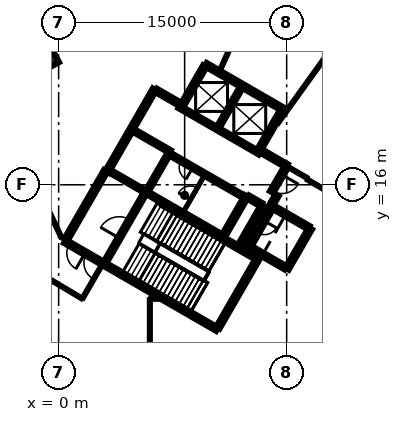
"""IFC4 building model, lengths in metres.
Left out: names, types, materials, properties, quantities, classifications, styles, units other than length and angle.
Written with IfcOpenShell. Run it as: python <this file> out.ifc"""

import sys

from ifc_helpers import new_model, si_unit, direction, frame, frame_2d, origin, origin_2d, place, context, subcontext, project, spatial, rectangle, extrude, element, fill, save


model = new_model("IFC4")
c1 = context("Model", 3, precision=1e-05, world=origin(), true_north=direction((0.0, 1.0)))
c2 = subcontext(c1, "Body", "Model", "MODEL_VIEW")
j1 = project(units=[si_unit("LENGTHUNIT", "METRE"), si_unit("PLANEANGLEUNIT", "RADIAN")], contexts=[c1])
p1 = place(None, origin())
s1 = spatial("IfcSite", under=j1, at=p1, CompositionType="ELEMENT")
p2 = place(p1, origin())
s2 = spatial("IfcBuilding", under=s1, at=p2, CompositionType="ELEMENT")
p3 = place(p2, origin())
s3 = spatial("IfcBuildingStorey", under=s2, at=p3, CompositionType="ELEMENT", Elevation=0.0)
p4 = place(p3, frame((-1.197, 24.423, -0.45), z_axis=(0.0, 0.0, 1.0), x_axis=(-0.476198301069, 0.879337920289, 0.0)))
e1 = element("IfcColumn", 1, at=p4, inside=s3, PredefinedType="COLUMN", context=c2, shape_type="SweptSolid", body=[
    extrude(rectangle(XDim=1.8, YDim=1.8, at=origin_2d()), origin(), (0.0, 0.0, 1.0), 5.15),
])
p5 = place(p3, frame((10.42, 6.498, 0.0), z_axis=(0.0, 0.0, 1.0), x_axis=(-0.866021906294, 0.500006057782, 0.0)))
e2 = element("IfcWall", 2, at=p5, inside=s3, PredefinedType="SHEAR", context=c2, shape_type="SweptSolid", body=[
    extrude(rectangle(XDim=11.55, YDim=0.25, at=frame_2d((5.775, 0.0))), origin(), (0.0, 0.0, 1.0), 7.1),
])
p6 = place(p5, frame((10.025, 0.0, 0.0)))
e3 = element("IfcOpeningElement", 3, at=p6, cuts=e2, PredefinedType="OPENING", context=c2, shape_type="SweptSolid", body=[
    extrude(rectangle(XDim=1.2, YDim=2.1, at=frame_2d((0.6, 1.05))), frame((0.0, 0.135, 0.0), z_axis=(0.0, -1.0, 0.0), x_axis=(1.0, 0.0, 0.0)), (0.0, 0.0, 1.0), 0.27),
])
p7 = place(p5, frame((8.725, 0.0, 0.0)))
e4 = element("IfcOpeningElement", 4, at=p7, cuts=e2, PredefinedType="OPENING", context=c2, shape_type="SweptSolid", body=[
    extrude(rectangle(XDim=1.2, YDim=2.1, at=frame_2d((0.6, 1.05))), frame((0.0, 0.135, 0.0), z_axis=(0.0, -1.0, 0.0), x_axis=(1.0, 0.0, 0.0)), (0.0, 0.0, 1.0), 0.27),
])
p8 = place(p3, frame((3.179, 16.856, 0.0), z_axis=(0.0, 0.0, 1.0), x_axis=(0.500004234368, 0.866022959057, 0.0)))
e5 = element("IfcWall", 5, at=p8, inside=s3, PredefinedType="SHEAR", context=c2, shape_type="SweptSolid", body=[
    extrude(rectangle(XDim=6.25, YDim=0.25, at=frame_2d((3.125, 0.0))), origin(), (0.0, 0.0, 1.0), 7.1),
])
p9 = place(p3, frame((9.673, 23.903, 0.0), z_axis=(0.0, 0.0, 1.0), x_axis=(0.86603616409, -0.499981362141, 0.0)))
e6 = element("IfcWall", 6, at=p9, inside=s3, PredefinedType="SHEAR", context=c2, shape_type="SweptSolid", body=[
    extrude(rectangle(XDim=5.85, YDim=0.25, at=frame_2d((2.925, 0.0))), origin(), (0.0, 0.0, 1.0), 7.1),
])
p10 = place(p3, frame((0.48, 12.381, 0.0), z_axis=(0.0, 0.0, 1.0), x_axis=(0.49999885962, 0.866026062182, 0.0)))
e7 = element("IfcWall", 7, at=p10, inside=s3, PredefinedType="SHEAR", context=c2, shape_type="SweptSolid", body=[
    extrude(rectangle(XDim=5.225, YDim=0.25, at=frame_2d((2.612, 0.0))), origin(), (0.0, 0.0, 1.0), 7.1),
])
p11 = place(p3, frame((13.238, 11.378, 0.0), z_axis=(0.0, 0.0, 1.0), x_axis=(-0.500008851346, -0.866020293397, 0.0)))
e8 = element("IfcWall", 8, at=p11, inside=s3, PredefinedType="SHEAR", context=c2, shape_type="SweptSolid", body=[
    extrude(rectangle(XDim=5.51, YDim=0.25, at=frame_2d((2.755, 0.0))), origin(), (0.0, 0.0, 1.0), 7.1),
])
p12 = place(p3, frame((12.357, 15.252, 0.0), z_axis=(0.0, 0.0, 1.0), x_axis=(-0.500028443584, -0.866008981251, 0.0)))
e9 = element("IfcWall", 9, at=p12, inside=s3, PredefinedType="SHEAR", context=c2, shape_type="SweptSolid", body=[
    extrude(rectangle(XDim=3.2, YDim=0.25, at=frame_2d((1.6, 0.0))), origin(), (0.0, 0.0, 1.0), 7.1),
])
for number, where, z_axis, x_axis in (
    (10, (8.123, 21.219, 0.0), (0.0, 0.0, 1.0), (0.5, 0.866, 0.0)),
    (11, (14.676, 20.87, 0.0), (0.0, 0.0, 1.0), (-0.5, -0.866, 0.0)),
):
    element("IfcWall", number, at=place(p3, frame(where, z_axis=z_axis, x_axis=x_axis)), inside=s3, PredefinedType="SHEAR", context=c2, shape_type="SweptSolid", body=[
        extrude(rectangle(XDim=2.975, YDim=0.25, at=frame_2d((1.487, 0.0))), origin(), (0.0, 0.0, 1.0), 7.1),
    ])
p13 = place(p3, frame((16.552, 13.119, 0.0), z_axis=(0.0, 0.0, 1.0), x_axis=(-0.499978833458, -0.866037623948, 0.0)))
e12 = element("IfcWall", 12, at=p13, inside=s3, PredefinedType="SHEAR", context=c2, shape_type="SweptSolid", body=[
    extrude(rectangle(XDim=3.05, YDim=0.25, at=frame_2d((1.525, 0.0))), origin(), (0.0, 0.0, 1.0), 7.1),
])
p14 = place(p3, frame((14.918, 10.54, 0.0), z_axis=(0.0, 0.0, 1.0), x_axis=(-0.866063538972, 0.499933942099, 0.0)))
e13 = element("IfcWall", 13, at=p14, inside=s3, PredefinedType="SHEAR", context=c2, shape_type="SweptSolid", body=[
    extrude(rectangle(XDim=2.865, YDim=0.25, at=frame_2d((1.432, 0.0))), origin(), (0.0, 0.0, 1.0), 7.1),
])
p15 = place(p3, frame((13.963, 14.614, 0.0), z_axis=(0.0, 0.0, 1.0), x_axis=(0.866042235819, -0.499970844928, 0.0)))
e14 = element("IfcWall", 14, at=p15, inside=s3, PredefinedType="SHEAR", context=c2, shape_type="SweptSolid", body=[
    extrude(rectangle(XDim=2.865, YDim=0.25, at=frame_2d((1.432, 0.0))), origin(), (0.0, 0.0, 1.0), 7.1),
])
p16 = place(p3, frame((11.888, 11.961, 0.0), z_axis=(0.0, 0.0, 1.0), x_axis=(0.500003324108, 0.866023484601, 0.0)))
e15 = element("IfcWall", 15, at=p16, inside=s3, PredefinedType="SHEAR", context=c2, shape_type="SweptSolid", body=[
    extrude(rectangle(XDim=3.085, YDim=0.25, at=frame_2d((1.542, 0.0))), origin(), (0.0, 0.0, 1.0), 7.1),
])
p17 = place(p3, frame((10.865, 12.418, 0.0), z_axis=(0.0, 0.0, 1.0), x_axis=(0.866026229868, -0.499998569178, 0.0)))
e16 = element("IfcWall", 16, at=p17, inside=s3, PredefinedType="SHEAR", context=c2, shape_type="SweptSolid", body=[
    extrude(rectangle(XDim=2.449, YDim=0.25, at=frame_2d((1.225, 0.0))), origin(), (0.0, 0.0, 1.0), 7.1),
])
p18 = place(p3, frame((13.297, 18.231, 0.0), z_axis=(0.0, 0.0, 1.0), x_axis=(0.866043531843, -0.499968599967, 0.0)))
e17 = element("IfcWall", 17, at=p18, inside=s3, PredefinedType="SHEAR", context=c2, shape_type="SweptSolid", body=[
    extrude(rectangle(XDim=1.975, YDim=0.25, at=frame_2d((0.987, 0.0))), origin(), (0.0, 0.0, 1.0), 7.1),
])
p19 = place(p3, frame((6.413, 22.206, 0.0), z_axis=(0.0, 0.0, 1.0), x_axis=(0.866016279763, -0.500015802937, 0.0)))
e18 = element("IfcWall", 18, at=p19, inside=s3, PredefinedType="SHEAR", context=c2, shape_type="SweptSolid", body=[
    extrude(rectangle(XDim=1.849, YDim=0.25, at=frame_2d((0.925, 0.0))), origin(), (0.0, 0.0, 1.0), 7.1),
])
p20 = place(p3, frame((14.945, 17.135, 0.0), z_axis=(0.0, 0.0, 1.0), x_axis=(-0.499983108224, -0.866035156036, 0.0)))
e19 = element("IfcWall", 19, at=p20, inside=s3, PredefinedType="SHEAR", context=c2, shape_type="SweptSolid", body=[
    extrude(rectangle(XDim=1.865, YDim=0.25, at=frame_2d((0.932, 0.0))), origin(), (0.0, 0.0, 1.0), 7.1),
])
p21 = place(p20, frame((0.535, 0.0, 0.0)))
e20 = element("IfcOpeningElement", 20, at=p21, cuts=e19, PredefinedType="OPENING", context=c2, shape_type="SweptSolid", body=[
    extrude(rectangle(XDim=1.25, YDim=2.1, at=frame_2d((0.625, 1.05))), frame((0.0, 0.135, 0.0), z_axis=(0.0, -1.0, 0.0), x_axis=(1.0, 0.0, 0.0)), (0.0, 0.0, 1.0), 0.27),
])
p22 = place(p3, frame((13.322, 14.695, 0.0), z_axis=(0.0, 0.0, 1.0), x_axis=(-0.866017078145, 0.500014420154, 0.0)))
e21 = element("IfcWall", 21, at=p22, inside=s3, PredefinedType="SHEAR", context=c2, shape_type="SweptSolid", body=[
    extrude(rectangle(XDim=0.989, YDim=0.25, at=frame_2d((0.495, 0.0))), origin(), (0.0, 0.0, 1.0), 7.1),
])
p23 = place(p3, frame((14.368, 15.315, 0.0), z_axis=(0.0, 0.0, 1.0), x_axis=(-0.499897359611, -0.866084655132, 0.0)))
e22 = element("IfcWall", 22, at=p23, inside=s3, PredefinedType="SHEAR", context=c2, shape_type="SweptSolid", body=[
    extrude(rectangle(XDim=0.685, YDim=0.25, at=frame_2d((0.342, 0.0))), origin(), (0.0, 0.0, 1.0), 7.1),
])
p24 = place(p3, frame((12.433, 11.964, 0.0), z_axis=(0.0, 0.0, 1.0), x_axis=(-0.866055875208, 0.499947218231, 0.0)))
e23 = element("IfcWall", 23, at=p24, inside=s3, PredefinedType="SHEAR", context=c2, shape_type="SweptSolid", body=[
    extrude(rectangle(XDim=0.345, YDim=0.25, at=frame_2d((0.172, 0.0))), origin(), (0.0, 0.0, 1.0), 7.1),
])
p25 = place(p3, frame((13.21, 18.08, 0.0), z_axis=(0.0, 0.0, 1.0), x_axis=(-0.866030299012, 0.499991521122, 0.0)))
e24 = element("IfcWall", 24, at=p25, inside=s3, PredefinedType="SHEAR", context=c2, shape_type="SweptSolid", body=[
    extrude(rectangle(XDim=6.1, YDim=0.2, at=frame_2d((3.05, 0.0))), origin(), (0.0, 0.0, 1.0), 7.1),
])
p26 = place(p25, frame((1.0, 0.0, 0.0)))
e25 = element("IfcOpeningElement", 25, at=p26, cuts=e24, PredefinedType="OPENING", context=c2, shape_type="SweptSolid", body=[
    extrude(rectangle(XDim=1.2, YDim=2.1, at=frame_2d((0.6, 1.05))), frame((0.0, 0.11, 0.0), z_axis=(0.0, -1.0, 0.0), x_axis=(1.0, 0.0, 0.0)), (0.0, 0.0, 1.0), 0.22),
])
p27 = place(p25, frame((4.05, 0.0, 0.0)))
e26 = element("IfcOpeningElement", 26, at=p27, cuts=e24, PredefinedType="OPENING", context=c2, shape_type="SweptSolid", body=[
    extrude(rectangle(XDim=1.2, YDim=2.1, at=frame_2d((0.6, 1.05))), frame((0.0, 0.11, 0.0), z_axis=(0.0, -1.0, 0.0), x_axis=(1.0, 0.0, 0.0)), (0.0, 0.0, 1.0), 0.22),
])
p28 = place(p3, frame((5.775, 15.502, 0.0), z_axis=(0.0, 0.0, 1.0), x_axis=(0.866020080793, -0.500009219579, 0.0)))
e27 = element("IfcWall", 27, at=p28, inside=s3, PredefinedType="SHEAR", context=c2, shape_type="SweptSolid", body=[
    extrude(rectangle(XDim=5.699, YDim=0.2, at=frame_2d((2.85, 0.0))), origin(), (0.0, 0.0, 1.0), 7.1),
])
p29 = place(p3, frame((12.185, 15.207, 0.0), z_axis=(0.0, 0.0, 1.0), x_axis=(-0.866020080793, 0.500009219579, 0.0)))
e28 = element("IfcWall", 28, at=p29, inside=s3, PredefinedType="SHEAR", context=c2, shape_type="SweptSolid", body=[
    extrude(rectangle(XDim=5.699, YDim=0.2, at=frame_2d((2.85, 0.0))), origin(), (0.0, 0.0, 1.0), 7.1),
])
p30 = place(p29, frame((3.874, 0.0, 0.0)))
e29 = element("IfcOpeningElement", 29, at=p30, cuts=e28, PredefinedType="OPENING", context=c2, shape_type="SweptSolid", body=[
    extrude(rectangle(XDim=0.9, YDim=2.1, at=frame_2d((0.45, 1.05))), frame((0.0, 0.11, 0.0), z_axis=(0.0, -1.0, 0.0), x_axis=(1.0, 0.0, 0.0)), (0.0, 0.0, 1.0), 0.22),
])
p31 = place(p3, frame((3.057, 10.895, 0.0), z_axis=(0.0, 0.0, 1.0), x_axis=(0.499989418164, 0.866031513124, 0.0)))
e30 = element("IfcWall", 30, at=p31, inside=s3, PredefinedType="SHEAR", context=c2, shape_type="SweptSolid", body=[
    extrude(rectangle(XDim=5.251, YDim=0.2, at=frame_2d((2.625, 0.0))), origin(), (0.0, 0.0, 1.0), 7.1),
])
p32 = place(p31, frame((1.849, 0.0, 0.0)))
e31 = element("IfcOpeningElement", 31, at=p32, cuts=e30, PredefinedType="OPENING", context=c2, shape_type="SweptSolid", body=[
    extrude(rectangle(XDim=1.4, YDim=2.1, at=frame_2d((0.7, 1.05))), frame((0.0, 0.11, 0.0), z_axis=(0.0, -1.0, 0.0), x_axis=(1.0, 0.0, 0.0)), (0.0, 0.0, 1.0), 0.22),
])
p33 = place(p3, frame((10.489, 19.767, 0.0), z_axis=(0.0, 0.0, 1.0), x_axis=(0.499946628782, 0.866056215479, 0.0)))
e32 = element("IfcWall", 32, at=p33, inside=s3, PredefinedType="SHEAR", context=c2, shape_type="SweptSolid", body=[
    extrude(rectangle(XDim=3.048, YDim=0.2, at=frame_2d((1.524, 0.0))), origin(), (0.0, 0.0, 1.0), 7.1),
])
p34 = place(p3, frame((14.008, 14.442, 0.0), z_axis=(0.0, 0.0, 1.0), x_axis=(-0.499986818241, -0.866033014143, 0.0)))
e33 = element("IfcWall", 33, at=p34, inside=s3, PredefinedType="SHEAR", context=c2, shape_type="SweptSolid", body=[
    extrude(rectangle(XDim=2.798, YDim=0.2, at=frame_2d((1.399, 0.0))), origin(), (0.0, 0.0, 1.0), 7.1),
])
p35 = place(p34, frame((0.949, 0.0, 0.0)))
e34 = element("IfcOpeningElement", 34, at=p35, cuts=e33, PredefinedType="OPENING", context=c2, shape_type="SweptSolid", body=[
    extrude(rectangle(XDim=0.9, YDim=2.1, at=frame_2d((0.45, 1.05))), frame((0.0, 0.11, 0.0), z_axis=(0.0, -1.0, 0.0), x_axis=(1.0, 0.0, 0.0)), (0.0, 0.0, 1.0), 0.22),
])
p36 = place(p3, frame((7.199, 17.97, 0.0), z_axis=(0.0, 0.0, 1.0), x_axis=(-0.499968400327, -0.866043647095, 0.0)))
e35 = element("IfcWall", 35, at=p36, inside=s3, PredefinedType="SHEAR", context=c2, shape_type="SweptSolid", body=[
    extrude(rectangle(XDim=2.75, YDim=0.2, at=frame_2d((1.375, 0.0))), origin(), (0.0, 0.0, 1.0), 7.1),
])
p37 = place(p3, frame((5.725, 15.531, 0.0), z_axis=(0.0, 0.0, 1.0), x_axis=(-0.866037306777, 0.499979382845, 0.0)))
e36 = element("IfcWall", 36, at=p37, inside=s3, PredefinedType="SHEAR", context=c2, shape_type="SweptSolid", body=[
    extrude(rectangle(XDim=2.742, YDim=0.2, at=frame_2d((1.371, 0.0))), origin(), (0.0, 0.0, 1.0), 7.1),
])
p38 = place(p37, frame((0.743, 0.0, 0.0)))
e37 = element("IfcOpeningElement", 37, at=p38, cuts=e36, PredefinedType="OPENING", context=c2, shape_type="SweptSolid", body=[
    extrude(rectangle(XDim=1.3, YDim=2.1, at=frame_2d((0.65, 1.05))), frame((0.0, 0.11, 0.0), z_axis=(0.0, -1.0, 0.0), x_axis=(1.0, 0.0, 0.0)), (0.0, 0.0, 1.0), 0.22),
])
p39 = place(p3, frame((4.901, 19.586, 0.0), z_axis=(0.0, 0.0, 1.0), x_axis=(0.866022890907, -0.500004352405, 0.0)))
e38 = element("IfcWall", 38, at=p39, inside=s3, PredefinedType="SHEAR", context=c2, shape_type="SweptSolid", body=[
    extrude(rectangle(XDim=2.799, YDim=0.2, at=frame_2d((1.399, 0.0))), origin(), (0.0, 0.0, 1.0), 7.1),
])
p40 = place(p3, frame((8.207, 14.214, 0.0), z_axis=(0.0, 0.0, 1.0), x_axis=(0.499922376475, 0.866070215109, 0.0)))
e39 = element("IfcWall", 39, at=p40, inside=s3, PredefinedType="PARTITIONING", context=c2, shape_type="SweptSolid", body=[
    extrude(rectangle(XDim=2.749, YDim=0.15, at=frame_2d((1.374, 0.0))), origin(), (0.0, 0.0, 1.0), 7.1),
])
p41 = place(p40, frame((0.924, 0.0, 0.0)))
e40 = element("IfcOpeningElement", 40, at=p41, cuts=e39, PredefinedType="OPENING", context=c2, shape_type="SweptSolid", body=[
    extrude(rectangle(XDim=0.9, YDim=2.1, at=frame_2d((0.45, 1.05))), frame((0.0, 0.085, 0.0), z_axis=(0.0, -1.0, 0.0), x_axis=(1.0, 0.0, 0.0)), (0.0, 0.0, 1.0), 0.17),
])
p42 = place(p3, frame((-5.981, 25.592, 0.0), z_axis=(0.0, 0.0, 1.0), x_axis=(0.426730602237, -0.904378788514, 0.0)))
e41 = element("IfcWall", 41, at=p42, inside=s3, PredefinedType="PARTITIONING", context=c2, shape_type="SweptSolid", body=[
    extrude(rectangle(XDim=14.442, YDim=0.2, at=frame_2d((7.221, 0.0))), origin(), (0.0, 0.0, 1.0), 4.7),
])
p43 = place(p3, frame((-1.521, 10.337, 0.0), z_axis=(0.0, 0.0, 1.0), x_axis=(0.859480916886, -0.511167833015, 0.0)))
e42 = element("IfcWall", 42, at=p43, inside=s3, PredefinedType="PARTITIONING", context=c2, shape_type="SweptSolid", body=[
    extrude(rectangle(XDim=3.586, YDim=0.2, at=frame_2d((1.793, 0.0))), origin(), (0.0, 0.0, 1.0), 7.1),
])
p44 = place(p3, frame((1.561, 8.504, 0.0), z_axis=(0.0, 0.0, 1.0), x_axis=(0.5001186023, 0.865956917885, 0.0)))
e43 = element("IfcWall", 43, at=p44, inside=s3, PredefinedType="PARTITIONING", context=c2, shape_type="SweptSolid", body=[
    extrude(rectangle(XDim=2.507, YDim=0.2, at=frame_2d((1.254, 0.0))), origin(), (0.0, 0.0, 1.0), 7.1),
])
p45 = place(p3, frame((6.0, -3.2, 0.0), z_axis=(0.0, 0.0, 1.0), x_axis=(0.0, 1.0, 0.0)))
e44 = element("IfcWall", 44, at=p45, inside=s3, PredefinedType="PARTITIONING", context=c2, shape_type="SweptSolid", body=[
    extrude(rectangle(XDim=11.7, YDim=0.2, at=frame_2d((5.85, 0.0))), origin(), (0.0, 0.0, 1.0), 6.2),
])
p46 = place(p45, frame((4.65, 0.0, 0.0)))
e45 = element("IfcOpeningElement", 45, at=p46, cuts=e44, PredefinedType="OPENING", context=c2, shape_type="SweptSolid", body=[
    extrude(rectangle(XDim=2.4, YDim=2.1, at=frame_2d((1.2, 1.05))), frame((0.0, 0.11, 0.0), z_axis=(0.0, -1.0, 0.0), x_axis=(1.0, 0.0, 0.0)), (0.0, 0.0, 1.0), 0.22),
])
p47 = place(p3, frame((6.0, 8.5, 0.0), z_axis=(0.0, 0.0, 1.0), x_axis=(1.0, 0.0, 0.0)))
e46 = element("IfcWall", 46, at=p47, inside=s3, PredefinedType="PARTITIONING", context=c2, shape_type="SweptSolid", body=[
    extrude(rectangle(XDim=0.582, YDim=0.2, at=frame_2d((0.291, 0.0))), origin(), (0.0, 0.0, 1.0), 6.2),
])
p48 = place(p3, frame((10.63, 23.564, 0.0), z_axis=(0.0, 0.0, 1.0), x_axis=(0.411194888758, 0.911547455407, 0.0)))
e47 = element("IfcWall", 47, at=p48, inside=s3, PredefinedType="PARTITIONING", context=c2, shape_type="SweptSolid", body=[
    extrude(rectangle(XDim=18.215, YDim=0.2, at=frame_2d((9.107, 0.0))), origin(), (0.0, 0.0, 1.0), 4.7),
])
p49 = place(p48, frame((5.3, 0.0, 0.0)))
e48 = element("IfcOpeningElement", 48, at=p49, cuts=e47, PredefinedType="OPENING", context=c2, shape_type="SweptSolid", body=[
    extrude(rectangle(XDim=2.0, YDim=2.1, at=frame_2d((1.0, 1.05))), frame((0.0, 0.11, 0.0), z_axis=(0.0, -1.0, 0.0), x_axis=(1.0, 0.0, 0.0)), (0.0, 0.0, 1.0), 0.22),
])
p50 = place(p3, frame((14.405, 20.029, 0.0), z_axis=(0.0, 0.0, 1.0), x_axis=(0.583802556312, 0.811895667709, 0.0)))
e49 = element("IfcWall", 49, at=p50, inside=s3, PredefinedType="PARTITIONING", context=c2, shape_type="SweptSolid", body=[
    extrude(rectangle(XDim=19.395, YDim=0.2, at=frame_2d((9.697, 0.0))), origin(), (0.0, 0.0, 1.0), 4.7),
])
p51 = place(p50, frame((6.915, 0.0, 0.0)))
e50 = element("IfcOpeningElement", 50, at=p51, cuts=e49, PredefinedType="OPENING", context=c2, shape_type="SweptSolid", body=[
    extrude(rectangle(XDim=0.9, YDim=2.1, at=frame_2d((0.45, 1.05))), frame((0.0, 0.11, 0.0), z_axis=(0.0, -1.0, 0.0), x_axis=(1.0, 0.0, 0.0)), (0.0, 0.0, 1.0), 0.22),
])
p52 = place(p3, frame((15.156, 17.13, 0.0), z_axis=(0.0, 0.0, 1.0), x_axis=(0.865983530368, -0.500072519872, 0.0)))
e51 = element("IfcWall", 51, at=p52, inside=s3, PredefinedType="PARTITIONING", context=c2, shape_type="SweptSolid", body=[
    extrude(rectangle(XDim=1.388, YDim=0.2, at=frame_2d((0.694, 0.0))), origin(), (0.0, 0.0, 1.0), 7.1),
])
p53 = place(p3, frame((16.33, 16.363, 0.0), z_axis=(0.0, 0.0, 1.0), x_axis=(0.859673908033, -0.510843196928, 0.0)))
e52 = element("IfcWall", 52, at=p53, inside=s3, PredefinedType="PARTITIONING", context=c2, shape_type="SweptSolid", body=[
    extrude(rectangle(XDim=2.52, YDim=0.2, at=frame_2d((1.26, 0.0))), origin(), (0.0, 0.0, 1.0), 7.1),
])
p54 = place(p38, origin())
e53 = element("IfcDoor", 53, at=p54, inside=s3, OperationType="SLIDING_TO_LEFT", PredefinedType="DOOR", context=c2, shape_type="SweptSolid", body=[
    extrude(rectangle(XDim=1.3, YDim=2.1, at=frame_2d((0.65, 1.05))), frame((0.0, 0.025, 0.0), z_axis=(0.0, -1.0, 0.0), x_axis=(1.0, 0.0, 0.0)), (0.0, 0.0, 1.0), 0.05),
])
fill(e37, e53)
p55 = place(p26, origin())
e54 = element("IfcDoor", 54, at=p55, inside=s3, OperationType="DOUBLE_DOOR_SLIDING", PredefinedType="DOOR", context=c2, shape_type="SweptSolid", body=[
    extrude(rectangle(XDim=1.2, YDim=2.1, at=frame_2d((0.6, 1.05))), frame((0.0, 0.025, 0.0), z_axis=(0.0, -1.0, 0.0), x_axis=(1.0, 0.0, 0.0)), (0.0, 0.0, 1.0), 0.05),
])
fill(e25, e54)
p56 = place(p27, origin())
e55 = element("IfcDoor", 55, at=p56, inside=s3, OperationType="DOUBLE_DOOR_SLIDING", PredefinedType="DOOR", context=c2, shape_type="SweptSolid", body=[
    extrude(rectangle(XDim=1.2, YDim=2.1, at=frame_2d((0.6, 1.05))), frame((0.0, 0.025, 0.0), z_axis=(0.0, -1.0, 0.0), x_axis=(1.0, 0.0, 0.0)), (0.0, 0.0, 1.0), 0.05),
])
fill(e26, e55)
p57 = place(p21, origin())
e56 = element("IfcDoor", 56, at=p57, inside=s3, OperationType="SINGLE_SWING_LEFT", PredefinedType="DOOR", context=c2, shape_type="SweptSolid", body=[
    extrude(rectangle(XDim=1.25, YDim=2.1, at=frame_2d((0.625, 1.05))), frame((0.0, 0.025, 0.0), z_axis=(0.0, -1.0, 0.0), x_axis=(1.0, 0.0, 0.0)), (0.0, 0.0, 1.0), 0.05),
])
fill(e20, e56)
p58 = place(p6, origin())
e57 = element("IfcDoor", 57, at=p58, inside=s3, OperationType="SINGLE_SWING_LEFT", PredefinedType="DOOR", context=c2, shape_type="SweptSolid", body=[
    extrude(rectangle(XDim=1.2, YDim=2.1, at=frame_2d((0.6, 1.05))), frame((0.0, 0.025, 0.0), z_axis=(0.0, -1.0, 0.0), x_axis=(1.0, 0.0, 0.0)), (0.0, 0.0, 1.0), 0.05),
])
fill(e3, e57)
p59 = place(p7, origin())
e58 = element("IfcDoor", 58, at=p59, inside=s3, OperationType="SINGLE_SWING_RIGHT", PredefinedType="DOOR", context=c2, shape_type="SweptSolid", body=[
    extrude(rectangle(XDim=1.2, YDim=2.1, at=frame_2d((0.6, 1.05))), frame((0.0, 0.025, 0.0), z_axis=(0.0, -1.0, 0.0), x_axis=(1.0, 0.0, 0.0)), (0.0, 0.0, 1.0), 0.05),
])
fill(e4, e58)
p60 = place(p32, origin())
e59 = element("IfcDoor", 59, at=p60, inside=s3, OperationType="SINGLE_SWING_LEFT", PredefinedType="DOOR", context=c2, shape_type="SweptSolid", body=[
    extrude(rectangle(XDim=1.4, YDim=2.1, at=frame_2d((0.7, 1.05))), frame((0.0, 0.025, 0.0), z_axis=(0.0, -1.0, 0.0), x_axis=(1.0, 0.0, 0.0)), (0.0, 0.0, 1.0), 0.05),
])
fill(e31, e59)
p61 = place(p30, origin())
e60 = element("IfcDoor", 60, at=p61, inside=s3, OperationType="SINGLE_SWING_RIGHT", PredefinedType="DOOR", context=c2, shape_type="SweptSolid", body=[
    extrude(rectangle(XDim=0.9, YDim=2.1, at=frame_2d((0.45, 1.05))), frame((0.0, 0.025, 0.0), z_axis=(0.0, -1.0, 0.0), x_axis=(1.0, 0.0, 0.0)), (0.0, 0.0, 1.0), 0.05),
])
fill(e29, e60)
p62 = place(p35, origin())
e61 = element("IfcDoor", 61, at=p62, inside=s3, OperationType="SINGLE_SWING_LEFT", PredefinedType="DOOR", context=c2, shape_type="SweptSolid", body=[
    extrude(rectangle(XDim=0.9, YDim=2.1, at=frame_2d((0.45, 1.05))), frame((0.0, 0.025, 0.0), z_axis=(0.0, -1.0, 0.0), x_axis=(1.0, 0.0, 0.0)), (0.0, 0.0, 1.0), 0.05),
])
fill(e34, e61)
p63 = place(p41, origin())
e62 = element("IfcDoor", 62, at=p63, inside=s3, OperationType="SINGLE_SWING_RIGHT", PredefinedType="DOOR", context=c2, shape_type="SweptSolid", body=[
    extrude(rectangle(XDim=0.9, YDim=2.1, at=frame_2d((0.45, 1.05))), frame((0.0, 0.025, 0.0), z_axis=(0.0, -1.0, 0.0), x_axis=(1.0, 0.0, 0.0)), (0.0, 0.0, 1.0), 0.05),
])
fill(e40, e62)
save(model, sys.argv[1])
